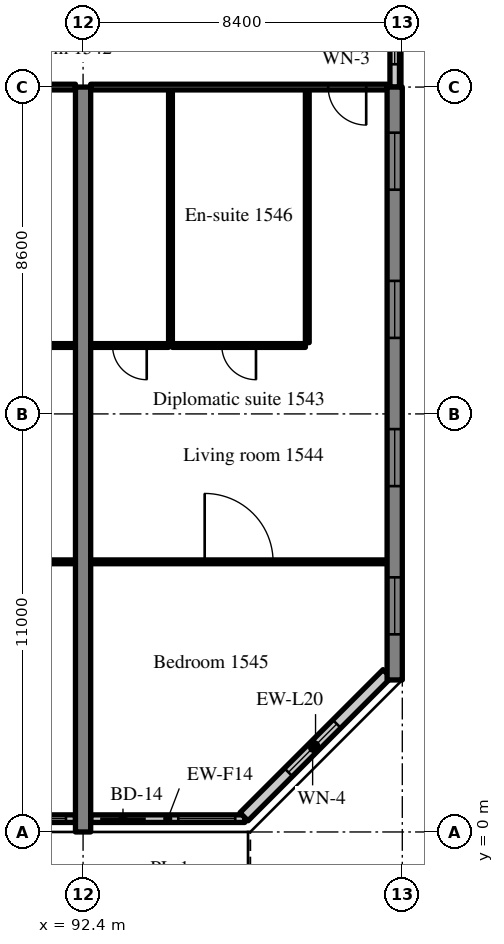
"""IFC4 building model, lengths in metres.
Left out: names, types, materials, properties, quantities, classifications, styles, units other than length and angle.
Written with IfcOpenShell. Run it as: python <this file> out.ifc"""

import sys

from ifc_helpers import new_model, si_unit, direction, frame, frame_2d, origin, place, context, subcontext, project, spatial, rectangle, extrude, source, transform, mapped, element, fill, save


model = new_model("IFC4")
c1 = context("Model", 3, precision=1e-05, world=origin(), true_north=direction((0.0, 1.0)))
c2 = subcontext(c1, "Body", "Model", "MODEL_VIEW")
j1 = project(units=[si_unit("LENGTHUNIT", "METRE"), si_unit("PLANEANGLEUNIT", "RADIAN")], contexts=[c1])
p1 = place(None, origin())
s1 = spatial("IfcSite", under=j1, at=p1, CompositionType="ELEMENT")
p2 = place(p1, origin())
s2 = spatial("IfcBuilding", under=s1, at=p2, CompositionType="ELEMENT")
p3 = place(p2, frame((0.0, 0.0, 65.8)))
s3 = spatial("IfcBuildingStorey", under=s2, at=p3, CompositionType="ELEMENT", Elevation=65.8)
m1 = source(origin(), c2, "Body", "SweptSolid", [
    extrude(rectangle(XDim=19.6, YDim=0.4, at=frame_2d((9.8, 0.0))), origin(), (0.0, 0.0, 1.0), 3.52),
])
p4 = place(p3, frame((92.4, 0.0, 0.0), z_axis=(0.0, 0.0, 1.0), x_axis=(0.0, 1.0, 0.0)))
e1 = element("IfcWall", 1, at=p4, inside=s3, PredefinedType="SHEAR", context=c2, shape_type="MappedRepresentation", body=[
    mapped(m1, transform((0.0, 0.0, 0.0), scale=1.0)),
])
m2 = source(origin(), c2, "Body", "SweptSolid", [
    extrude(rectangle(XDim=15.6, YDim=0.4, at=frame_2d((7.8, 0.0))), origin(), (0.0, 0.0, 1.0), 3.52),
])
p5 = place(p3, frame((100.6, 4.0, 0.0), z_axis=(0.0, 0.0, 1.0), x_axis=(0.0, 1.0, 0.0)))
e2 = element("IfcWall", 2, at=p5, inside=s3, PredefinedType="SHEAR", context=c2, shape_type="MappedRepresentation", body=[
    mapped(m2, transform((0.0, 0.0, 0.0), scale=1.0)),
])
m3 = source(origin(), c2, "Body", "SweptSolid", [
    extrude(rectangle(XDim=1.5, YDim=1.5, at=frame_2d((0.75, 0.75))), frame((0.0, 0.21, 0.0), z_axis=(0.0, -1.0, 0.0), x_axis=(1.0, 0.0, 0.0)), (0.0, 0.0, 1.0), 0.42),
])
p6 = place(p5, frame((1.2, 0.0, 0.9)))
e3 = element("IfcOpeningElement", 3, at=p6, cuts=e2, PredefinedType="OPENING", context=c2, shape_type="MappedRepresentation", body=[
    mapped(m3, transform((0.0, 0.0, 0.0), scale=1.0)),
])
p7 = place(p5, frame((5.1, 0.0, 0.9)))
e4 = element("IfcOpeningElement", 4, at=p7, cuts=e2, PredefinedType="OPENING", context=c2, shape_type="MappedRepresentation", body=[
    mapped(m3, transform((0.0, 0.0, 0.0), scale=1.0)),
])
p8 = place(p5, frame((9.0, 0.0, 0.9)))
e5 = element("IfcOpeningElement", 5, at=p8, cuts=e2, PredefinedType="OPENING", context=c2, shape_type="MappedRepresentation", body=[
    mapped(m3, transform((0.0, 0.0, 0.0), scale=1.0)),
])
p9 = place(p5, frame((12.9, 0.0, 0.9)))
e6 = element("IfcOpeningElement", 6, at=p9, cuts=e2, PredefinedType="OPENING", context=c2, shape_type="MappedRepresentation", body=[
    mapped(m3, transform((0.0, 0.0, 0.0), scale=1.0)),
])
m4 = source(origin(), c2, "Body", "SweptSolid", [
    extrude(rectangle(XDim=3.6, YDim=0.2, at=frame_2d((1.8, 0.0))), origin(), (0.0, 0.0, 1.0), 2.82),
])
p10 = place(p3, frame((88.6, 0.35, 0.0), z_axis=(0.0, 0.0, 1.0), x_axis=(1.0, 0.0, 0.0)))
e7 = element("IfcWall", 7, at=p10, inside=s3, PredefinedType="SOLIDWALL", context=c2, shape_type="MappedRepresentation", body=[
    mapped(m4, transform((0.0, 0.0, 0.0), scale=1.0)),
])
m5 = source(origin(), c2, "Body", "SweptSolid", [
    extrude(rectangle(XDim=1.2, YDim=2.4, at=frame_2d((0.6, 1.2))), frame((0.0, 0.11, 0.0), z_axis=(0.0, -1.0, 0.0), x_axis=(1.0, 0.0, 0.0)), (0.0, 0.0, 1.0), 0.22),
])
p11 = place(p10, frame((0.25, 0.0, 0.0)))
e8 = element("IfcOpeningElement", 8, at=p11, cuts=e7, PredefinedType="OPENING", context=c2, shape_type="MappedRepresentation", body=[
    mapped(m5, transform((0.0, 0.0, 0.0), scale=1.0)),
])
m6 = source(origin(), c2, "Body", "SweptSolid", [
    extrude(rectangle(XDim=1.5, YDim=1.5, at=frame_2d((0.75, 0.75))), frame((0.0, 0.11, 0.0), z_axis=(0.0, -1.0, 0.0), x_axis=(1.0, 0.0, 0.0)), (0.0, 0.0, 1.0), 0.22),
])
p12 = place(p10, frame((1.85, 0.0, 0.9)))
e9 = element("IfcOpeningElement", 9, at=p12, cuts=e7, PredefinedType="OPENING", context=c2, shape_type="MappedRepresentation", body=[
    mapped(m6, transform((0.0, 0.0, 0.0), scale=1.0)),
])
m7 = source(origin(), c2, "Body", "SweptSolid", [
    extrude(rectangle(XDim=4.055, YDim=0.2, at=frame_2d((2.027, 0.0))), origin(), (0.0, 0.0, 1.0), 2.82),
])
p13 = place(p3, frame((92.6, 0.35, 0.0), z_axis=(0.0, 0.0, 1.0), x_axis=(1.0, 0.0, 0.0)))
e10 = element("IfcWall", 10, at=p13, inside=s3, PredefinedType="SOLIDWALL", context=c2, shape_type="MappedRepresentation", body=[
    mapped(m7, transform((0.0, 0.0, 0.0), scale=1.0)),
])
p14 = place(p13, frame((0.25, 0.0, 0.0)))
e11 = element("IfcOpeningElement", 11, at=p14, cuts=e10, PredefinedType="OPENING", context=c2, shape_type="MappedRepresentation", body=[
    mapped(m5, transform((0.0, 0.0, 0.0), scale=1.0)),
])
p15 = place(p13, frame((2.305, 0.0, 0.9)))
e12 = element("IfcOpeningElement", 12, at=p15, cuts=e10, PredefinedType="OPENING", context=c2, shape_type="MappedRepresentation", body=[
    mapped(m6, transform((0.0, 0.0, 0.0), scale=1.0)),
])
m8 = source(origin(), c2, "Body", "SweptSolid", [
    extrude(rectangle(XDim=5.326, YDim=0.3, at=frame_2d((2.663, 0.0))), origin(), (0.0, 0.0, 1.0), 3.52),
])
p16 = place(p3, frame((96.634, 0.4, 0.0), z_axis=(0.0, 0.0, 1.0), x_axis=(0.707083859269, 0.707129702361, 0.0)))
e13 = element("IfcWall", 13, at=p16, inside=s3, PredefinedType="SOLIDWALL", context=c2, shape_type="MappedRepresentation", body=[
    mapped(m8, transform((0.0, 0.0, 0.0), scale=1.0)),
])
m9 = source(origin(), c2, "Body", "SweptSolid", [
    extrude(rectangle(XDim=1.8, YDim=1.5, at=frame_2d((0.9, 0.75))), frame((0.0, 0.16, 0.0), z_axis=(0.0, -1.0, 0.0), x_axis=(1.0, 0.0, 0.0)), (0.0, 0.0, 1.0), 0.32),
])
p17 = place(p16, frame((1.654, 0.0, 0.9)))
e14 = element("IfcOpeningElement", 14, at=p17, cuts=e13, PredefinedType="OPENING", context=c2, shape_type="MappedRepresentation", body=[
    mapped(m9, transform((0.0, 0.0, 0.0), scale=1.0)),
])
m10 = source(origin(), c2, "Body", "SweptSolid", [
    extrude(rectangle(XDim=2.4, YDim=0.25, at=frame_2d((1.2, 0.0))), origin(), (0.0, 0.0, 1.0), 2.62),
])
p18 = place(p3, frame((100.6, 19.6, 0.0), z_axis=(0.0, 0.0, 1.0), x_axis=(0.0, 1.0, 0.0)))
e15 = element("IfcWall", 15, at=p18, inside=s3, PredefinedType="SOLIDWALL", context=c2, shape_type="MappedRepresentation", body=[
    mapped(m10, transform((0.0, 0.0, 0.0), scale=1.0)),
])
m11 = source(origin(), c2, "Body", "SweptSolid", [
    extrude(rectangle(XDim=1.2, YDim=1.5, at=frame_2d((0.6, 0.75))), frame((0.0, 0.135, 0.0), z_axis=(0.0, -1.0, 0.0), x_axis=(1.0, 0.0, 0.0)), (0.0, 0.0, 1.0), 0.27),
])
p19 = place(p18, frame((0.6, 0.0, 0.9)))
e16 = element("IfcOpeningElement", 16, at=p19, cuts=e15, PredefinedType="OPENING", context=c2, shape_type="MappedRepresentation", body=[
    mapped(m11, transform((0.0, 0.0, 0.0), scale=1.0)),
])
m12 = source(origin(), c2, "Body", "SweptSolid", [
    extrude(rectangle(XDim=2.25, YDim=0.1, at=frame_2d((1.125, 0.0))), origin(), (0.0, 0.0, 1.0), 3.52),
])
p20 = place(p3, frame((89.95, 12.8, 0.0), z_axis=(0.0, 0.0, 1.0), x_axis=(1.0, 0.0, 0.0)))
e17 = element("IfcWall", 17, at=p20, inside=s3, PredefinedType="PARTITIONING", context=c2, shape_type="MappedRepresentation", body=[
    mapped(m12, transform((0.0, 0.0, 0.0), scale=1.0)),
])
m13 = source(origin(), c2, "Body", "SweptSolid", [
    extrude(rectangle(XDim=0.9, YDim=2.1, at=frame_2d((0.45, 1.05))), frame((0.0, 0.06, 0.0), z_axis=(0.0, -1.0, 0.0), x_axis=(1.0, 0.0, 0.0)), (0.0, 0.0, 1.0), 0.12),
])
p21 = place(p20, frame((0.675, 0.0, 0.0)))
e18 = element("IfcOpeningElement", 18, at=p21, cuts=e17, PredefinedType="OPENING", context=c2, shape_type="MappedRepresentation", body=[
    mapped(m13, transform((0.0, 0.0, 0.0), scale=1.0)),
])
m14 = source(origin(), c2, "Body", "SweptSolid", [
    extrude(rectangle(XDim=8.0, YDim=0.1, at=frame_2d((4.0, 0.0))), origin(), (0.0, 0.0, 1.0), 3.52),
])
p22 = place(p3, frame((84.2, 7.108, 0.0), z_axis=(0.0, 0.0, 1.0), x_axis=(1.0, 0.0, 0.0)))
e19 = element("IfcWall", 19, at=p22, inside=s3, PredefinedType="PARTITIONING", context=c2, shape_type="MappedRepresentation", body=[
    mapped(m14, transform((0.0, 0.0, 0.0), scale=1.0)),
])
m15 = source(origin(), c2, "Body", "SweptSolid", [
    extrude(rectangle(XDim=1.8, YDim=2.1, at=frame_2d((0.9, 1.05))), frame((0.0, 0.06, 0.0), z_axis=(0.0, -1.0, 0.0), x_axis=(1.0, 0.0, 0.0)), (0.0, 0.0, 1.0), 0.12),
])
p23 = place(p22, frame((3.1, 0.0, 0.0)))
e20 = element("IfcOpeningElement", 20, at=p23, cuts=e19, PredefinedType="OPENING", context=c2, shape_type="MappedRepresentation", body=[
    mapped(m15, transform((0.0, 0.0, 0.0), scale=1.0)),
])
m16 = source(origin(), c2, "Body", "SweptSolid", [
    extrude(rectangle(XDim=8.0, YDim=0.15, at=frame_2d((4.0, 0.0))), origin(), (0.0, 0.0, 1.0), 2.82),
])
p24 = place(p3, frame((84.2, 19.6, 0.0), z_axis=(0.0, 0.0, 1.0), x_axis=(1.0, 0.0, 0.0)))
e21 = element("IfcWall", 21, at=p24, inside=s3, PredefinedType="PARTITIONING", context=c2, shape_type="MappedRepresentation", body=[
    mapped(m16, transform((0.0, 0.0, 0.0), scale=1.0)),
])
m17 = source(origin(), c2, "Body", "SweptSolid", [
    extrude(rectangle(XDim=1.0, YDim=2.1, at=frame_2d((0.5, 1.05))), frame((0.0, 0.085, 0.0), z_axis=(0.0, -1.0, 0.0), x_axis=(1.0, 0.0, 0.0)), (0.0, 0.0, 1.0), 0.17),
])
p25 = place(p24, frame((0.55, 0.0, 0.0)))
e22 = element("IfcOpeningElement", 22, at=p25, cuts=e21, PredefinedType="OPENING", context=c2, shape_type="MappedRepresentation", body=[
    mapped(m17, transform((0.0, 0.0, 0.0), scale=1.0)),
])
m18 = source(origin(), c2, "Body", "SweptSolid", [
    extrude(rectangle(XDim=6.65, YDim=0.1, at=frame_2d((3.325, 0.0))), origin(), (0.0, 0.0, 1.0), 3.52),
])
for number, where, z_axis, x_axis in (
    (23, (98.3, 12.875, 0.0), (0.0, 0.0, 1.0), (0.0, 1.0, 0.0)),
    (24, (94.7, 12.875, 0.0), (0.0, 0.0, 1.0), (0.0, 1.0, 0.0)),
):
    element("IfcWall", number, at=place(p3, frame(where, z_axis=z_axis, x_axis=x_axis)), inside=s3, PredefinedType="PARTITIONING", context=c2, shape_type="MappedRepresentation", body=[
        mapped(m18, transform((0.0, 0.0, 0.0), scale=1.0)),
    ])
m19 = source(origin(), c2, "Body", "SweptSolid", [
    extrude(rectangle(XDim=3.5, YDim=0.1, at=frame_2d((1.75, 0.0))), origin(), (0.0, 0.0, 1.0), 3.52),
])
p26 = place(p3, frame((94.75, 12.8, 0.0), z_axis=(0.0, 0.0, 1.0), x_axis=(1.0, 0.0, 0.0)))
e25 = element("IfcWall", 25, at=p26, inside=s3, PredefinedType="PARTITIONING", context=c2, shape_type="MappedRepresentation", body=[
    mapped(m19, transform((0.0, 0.0, 0.0), scale=1.0)),
])
p27 = place(p26, frame((1.3, 0.0, 0.0)))
e26 = element("IfcOpeningElement", 26, at=p27, cuts=e25, PredefinedType="OPENING", context=c2, shape_type="MappedRepresentation", body=[
    mapped(m13, transform((0.0, 0.0, 0.0), scale=1.0)),
])
m20 = source(origin(), c2, "Body", "SweptSolid", [
    extrude(rectangle(XDim=2.05, YDim=0.1, at=frame_2d((1.025, 0.0))), origin(), (0.0, 0.0, 1.0), 3.52),
])
p28 = place(p3, frame((92.6, 12.8, 0.0), z_axis=(0.0, 0.0, 1.0), x_axis=(1.0, 0.0, 0.0)))
e27 = element("IfcWall", 27, at=p28, inside=s3, PredefinedType="PARTITIONING", context=c2, shape_type="MappedRepresentation", body=[
    mapped(m20, transform((0.0, 0.0, 0.0), scale=1.0)),
])
p29 = place(p28, frame((0.575, 0.0, 0.0)))
e28 = element("IfcOpeningElement", 28, at=p29, cuts=e27, PredefinedType="OPENING", context=c2, shape_type="MappedRepresentation", body=[
    mapped(m13, transform((0.0, 0.0, 0.0), scale=1.0)),
])
m21 = source(origin(), c2, "Body", "SweptSolid", [
    extrude(rectangle(XDim=7.8, YDim=0.1, at=frame_2d((3.9, 0.0))), origin(), (0.0, 0.0, 1.0), 3.52),
])
p30 = place(p3, frame((92.6, 7.108, 0.0), z_axis=(0.0, 0.0, 1.0), x_axis=(1.0, 0.0, 0.0)))
e29 = element("IfcWall", 29, at=p30, inside=s3, PredefinedType="PARTITIONING", context=c2, shape_type="MappedRepresentation", body=[
    mapped(m21, transform((0.0, 0.0, 0.0), scale=1.0)),
])
p31 = place(p30, frame((3.0, 0.0, 0.0)))
e30 = element("IfcOpeningElement", 30, at=p31, cuts=e29, PredefinedType="OPENING", context=c2, shape_type="MappedRepresentation", body=[
    mapped(m15, transform((0.0, 0.0, 0.0), scale=1.0)),
])
m22 = source(origin(), c2, "Body", "SweptSolid", [
    extrude(rectangle(XDim=7.8, YDim=0.15, at=frame_2d((3.9, 0.0))), origin(), (0.0, 0.0, 1.0), 2.82),
])
p32 = place(p3, frame((92.6, 19.6, 0.0), z_axis=(0.0, 0.0, 1.0), x_axis=(1.0, 0.0, 0.0)))
e31 = element("IfcWall", 31, at=p32, inside=s3, PredefinedType="PARTITIONING", context=c2, shape_type="MappedRepresentation", body=[
    mapped(m22, transform((0.0, 0.0, 0.0), scale=1.0)),
])
p33 = place(p32, frame((6.25, 0.0, 0.0)))
e32 = element("IfcOpeningElement", 32, at=p33, cuts=e31, PredefinedType="OPENING", context=c2, shape_type="MappedRepresentation", body=[
    mapped(m17, transform((0.0, 0.0, 0.0), scale=1.0)),
])
m23 = source(origin(), c2, "Body", "SweptSolid", [
    extrude(rectangle(XDim=1.5, YDim=1.5, at=frame_2d((0.75, 0.75))), frame((0.0, 0.03, 0.0), z_axis=(0.0, -1.0, 0.0), x_axis=(1.0, 0.0, 0.0)), (0.0, 0.0, 1.0), 0.06),
])
p34 = place(p12, origin())
e33 = element("IfcWindow", 33, at=p34, inside=s3, PartitioningType="SINGLE_PANEL", PredefinedType="WINDOW", context=c2, shape_type="MappedRepresentation", body=[
    mapped(m23, transform((0.0, 0.0, 0.0), scale=1.0)),
])
fill(e9, e33)
m24 = source(origin(), c2, "Body", "SweptSolid", [
    extrude(rectangle(XDim=1.2, YDim=2.4, at=frame_2d((0.6, 1.2))), frame((0.0, 0.025, 0.0), z_axis=(0.0, -1.0, 0.0), x_axis=(1.0, 0.0, 0.0)), (0.0, 0.0, 1.0), 0.05),
])
p35 = place(p14, origin())
e34 = element("IfcDoor", 34, at=p35, inside=s3, OperationType="SLIDING_TO_RIGHT", PredefinedType="DOOR", context=c2, shape_type="MappedRepresentation", body=[
    mapped(m24, transform((0.0, 0.0, 0.0), scale=1.0)),
])
fill(e11, e34)
p36 = place(p15, origin())
e35 = element("IfcWindow", 35, at=p36, inside=s3, PartitioningType="SINGLE_PANEL", PredefinedType="WINDOW", context=c2, shape_type="MappedRepresentation", body=[
    mapped(m23, transform((0.0, 0.0, 0.0), scale=1.0)),
])
fill(e12, e35)
m25 = source(origin(), c2, "Body", "SweptSolid", [
    extrude(rectangle(XDim=1.8, YDim=1.5, at=frame_2d((0.9, 0.75))), frame((0.0, 0.03, 0.0), z_axis=(0.0, -1.0, 0.0), x_axis=(1.0, 0.0, 0.0)), (0.0, 0.0, 1.0), 0.06),
])
p37 = place(p17, origin())
e36 = element("IfcWindow", 36, at=p37, inside=s3, PartitioningType="SINGLE_PANEL", PredefinedType="WINDOW", context=c2, shape_type="MappedRepresentation", body=[
    mapped(m25, transform((0.0, 0.0, 0.0), scale=1.0)),
])
fill(e14, e36)
p38 = place(p6, origin())
e37 = element("IfcWindow", 37, at=p38, inside=s3, PartitioningType="SINGLE_PANEL", PredefinedType="WINDOW", context=c2, shape_type="MappedRepresentation", body=[
    mapped(m23, transform((0.0, 0.0, 0.0), scale=1.0)),
])
fill(e3, e37)
p39 = place(p7, origin())
e38 = element("IfcWindow", 38, at=p39, inside=s3, PartitioningType="SINGLE_PANEL", PredefinedType="WINDOW", context=c2, shape_type="MappedRepresentation", body=[
    mapped(m23, transform((0.0, 0.0, 0.0), scale=1.0)),
])
fill(e4, e38)
p40 = place(p8, origin())
e39 = element("IfcWindow", 39, at=p40, inside=s3, PartitioningType="SINGLE_PANEL", PredefinedType="WINDOW", context=c2, shape_type="MappedRepresentation", body=[
    mapped(m23, transform((0.0, 0.0, 0.0), scale=1.0)),
])
fill(e5, e39)
p41 = place(p9, origin())
e40 = element("IfcWindow", 40, at=p41, inside=s3, PartitioningType="SINGLE_PANEL", PredefinedType="WINDOW", context=c2, shape_type="MappedRepresentation", body=[
    mapped(m23, transform((0.0, 0.0, 0.0), scale=1.0)),
])
fill(e6, e40)
m26 = source(origin(), c2, "Body", "SweptSolid", [
    extrude(rectangle(XDim=1.2, YDim=1.5, at=frame_2d((0.6, 0.75))), frame((0.0, 0.03, 0.0), z_axis=(0.0, -1.0, 0.0), x_axis=(1.0, 0.0, 0.0)), (0.0, 0.0, 1.0), 0.06),
])
p42 = place(p19, origin())
e41 = element("IfcWindow", 41, at=p42, inside=s3, PartitioningType="SINGLE_PANEL", PredefinedType="WINDOW", context=c2, shape_type="MappedRepresentation", body=[
    mapped(m26, transform((0.0, 0.0, 0.0), scale=1.0)),
])
fill(e16, e41)
m27 = source(origin(), c2, "Body", "SweptSolid", [
    extrude(rectangle(XDim=0.9, YDim=2.1, at=frame_2d((0.45, 1.05))), frame((0.0, 0.025, 0.0), z_axis=(0.0, -1.0, 0.0), x_axis=(1.0, 0.0, 0.0)), (0.0, 0.0, 1.0), 0.05),
])
p43 = place(p27, origin())
e42 = element("IfcDoor", 42, at=p43, inside=s3, OperationType="SINGLE_SWING_RIGHT", PredefinedType="DOOR", context=c2, shape_type="MappedRepresentation", body=[
    mapped(m27, transform((0.0, 0.0, 0.0), scale=1.0)),
])
fill(e26, e42)
p44 = place(p29, origin())
e43 = element("IfcDoor", 43, at=p44, inside=s3, OperationType="SINGLE_SWING_RIGHT", PredefinedType="DOOR", context=c2, shape_type="MappedRepresentation", body=[
    mapped(m27, transform((0.0, 0.0, 0.0), scale=1.0)),
])
fill(e28, e43)
m28 = source(origin(), c2, "Body", "SweptSolid", [
    extrude(rectangle(XDim=1.8, YDim=2.1, at=frame_2d((0.9, 1.05))), frame((0.0, 0.025, 0.0), z_axis=(0.0, -1.0, 0.0), x_axis=(1.0, 0.0, 0.0)), (0.0, 0.0, 1.0), 0.05),
])
p45 = place(p31, origin())
e44 = element("IfcDoor", 44, at=p45, inside=s3, OperationType="DOUBLE_DOOR_SINGLE_SWING", PredefinedType="DOOR", context=c2, shape_type="MappedRepresentation", body=[
    mapped(m28, transform((0.0, 0.0, 0.0), scale=1.0)),
])
fill(e30, e44)
m29 = source(origin(), c2, "Body", "SweptSolid", [
    extrude(rectangle(XDim=1.0, YDim=2.1, at=frame_2d((0.5, 1.05))), frame((0.0, 0.025, 0.0), z_axis=(0.0, -1.0, 0.0), x_axis=(1.0, 0.0, 0.0)), (0.0, 0.0, 1.0), 0.05),
])
p46 = place(p33, origin())
e45 = element("IfcDoor", 45, at=p46, inside=s3, OperationType="SINGLE_SWING_RIGHT", PredefinedType="DOOR", context=c2, shape_type="MappedRepresentation", body=[
    mapped(m29, transform((0.0, 0.0, 0.0), scale=1.0)),
])
fill(e32, e45)
save(model, sys.argv[1])
